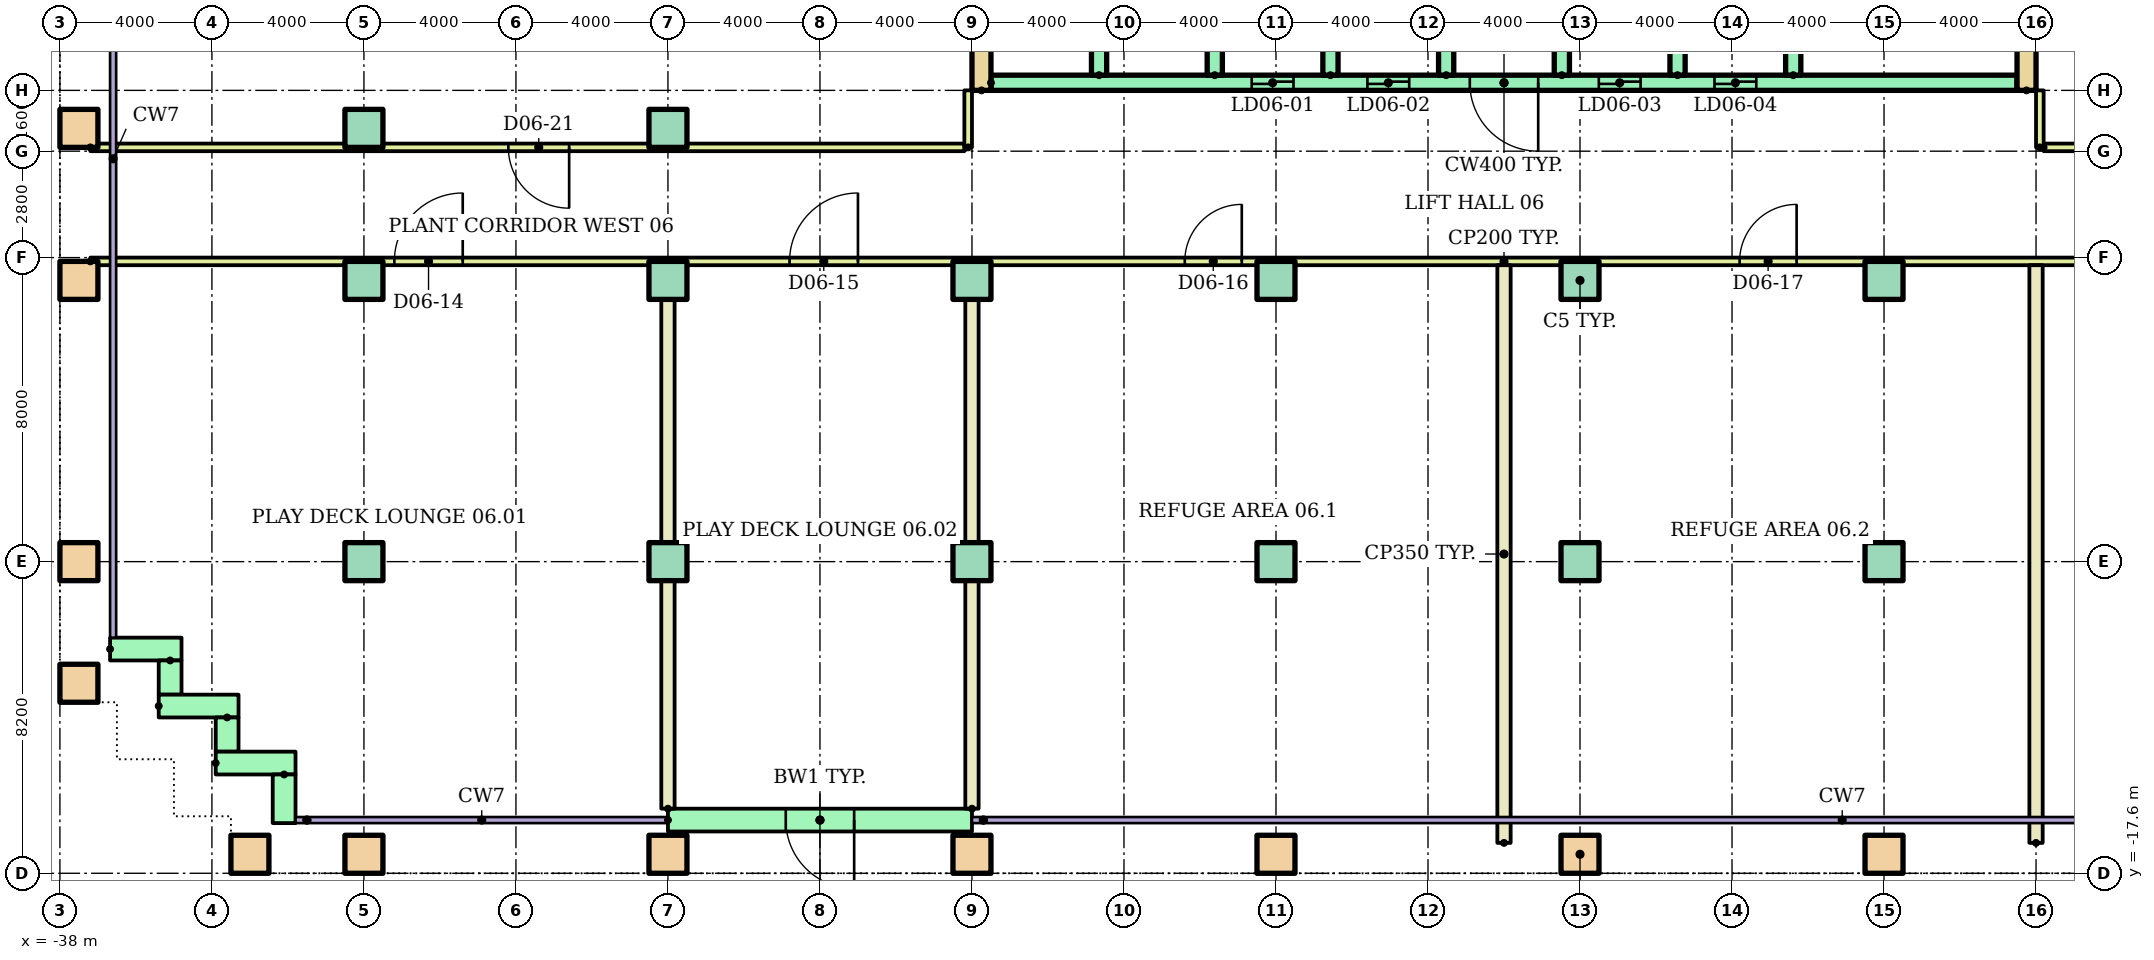
"""IFC4 building model, lengths in metres.
Left out: names, types, materials, properties, quantities, classifications, styles, units other than length and angle.
Written with IfcOpenShell. Run it as: python <this file> out.ifc"""

import sys

from ifc_helpers import new_model, si_unit, direction, frame, frame_2d, origin, origin_2d, place, context, subcontext, project, spatial, rectangle, hollow_rectangle, extrude, element, fill, save


model = new_model("IFC4")
c1 = context("Model", 3, precision=1e-05, world=origin(), true_north=direction((0.0, 1.0)))
c2 = subcontext(c1, "Body", "Model", "MODEL_VIEW")
j1 = project(units=[si_unit("LENGTHUNIT", "METRE"), si_unit("PLANEANGLEUNIT", "RADIAN")], contexts=[c1])
p1 = place(None, origin())
s1 = spatial("IfcSite", under=j1, at=p1, CompositionType="ELEMENT")
p2 = place(p1, origin())
s2 = spatial("IfcBuilding", under=s1, at=p2, CompositionType="ELEMENT")
p3 = place(p2, frame((0.0, 0.0, 26.0)))
s3 = spatial("IfcBuildingStorey", under=s2, at=p3, CompositionType="ELEMENT", Elevation=26.0)
for number, where in (
    (1, (-33.0, -17.1, 0.0)),
    (2, (-30.0, -17.1, 0.0)),
    (3, (-22.0, -17.1, 0.0)),
    (4, (-14.0, -17.1, 0.0)),
    (5, (-6.0, -17.1, 0.0)),
    (6, (2.0, -17.1, 0.0)),
    (7, (10.0, -17.1, 0.0)),
    (8, (-37.5, -12.6, 0.0)),
    (9, (-37.5, -9.4, 0.0)),
):
    element("IfcColumn", number, at=place(p3, frame(where)), inside=s3, PredefinedType="COLUMN", context=c2, shape_type="SweptSolid", body=[
        extrude(hollow_rectangle(XDim=1.0, YDim=1.0, WallThickness=0.05, at=origin_2d()), origin(), (0.0, 0.0, 1.0), 3.9),
    ])
for number, where in (
    (10, (-30.0, -9.4, 0.0)),
    (11, (-22.0, -9.4, 0.0)),
    (12, (-14.0, -9.4, 0.0)),
    (13, (-6.0, -9.4, 0.0)),
    (14, (2.0, -9.4, 0.0)),
    (15, (10.0, -9.4, 0.0)),
):
    element("IfcColumn", number, at=place(p3, frame(where)), inside=s3, PredefinedType="COLUMN", context=c2, shape_type="SweptSolid", body=[
        extrude(rectangle(XDim=1.0, YDim=1.0, at=origin_2d()), origin(), (0.0, 0.0, 1.0), 3.9),
    ])
p4 = place(p3, frame((-37.5, -2.0, 0.0)))
e16 = element("IfcColumn", 16, at=p4, inside=s3, PredefinedType="COLUMN", context=c2, shape_type="SweptSolid", body=[
    extrude(hollow_rectangle(XDim=1.0, YDim=1.0, WallThickness=0.05, at=origin_2d()), origin(), (0.0, 0.0, 1.0), 3.9),
])
for number, where in (
    (17, (-30.0, -2.0, 0.0)),
    (18, (-22.0, -2.0, 0.0)),
    (19, (-14.0, -2.0, 0.0)),
    (20, (-6.0, -2.0, 0.0)),
    (21, (2.0, -2.0, 0.0)),
    (22, (10.0, -2.0, 0.0)),
):
    element("IfcColumn", number, at=place(p3, frame(where)), inside=s3, PredefinedType="COLUMN", context=c2, shape_type="SweptSolid", body=[
        extrude(rectangle(XDim=1.0, YDim=1.0, at=origin_2d()), origin(), (0.0, 0.0, 1.0), 3.9),
    ])
p5 = place(p3, frame((-37.5, 2.0, 0.0)))
e23 = element("IfcColumn", 23, at=p5, inside=s3, PredefinedType="COLUMN", context=c2, shape_type="SweptSolid", body=[
    extrude(hollow_rectangle(XDim=1.0, YDim=1.0, WallThickness=0.05, at=origin_2d()), origin(), (0.0, 0.0, 1.0), 3.9),
])
for number, where in (
    (24, (-30.0, 2.0, 0.0)),
    (25, (-22.0, 2.0, 0.0)),
):
    element("IfcColumn", number, at=place(p3, frame(where)), inside=s3, PredefinedType="COLUMN", context=c2, shape_type="SweptSolid", body=[
        extrude(rectangle(XDim=1.0, YDim=1.0, at=origin_2d()), origin(), (0.0, 0.0, 1.0), 3.9),
    ])
p6 = place(p3, frame((-36.68, -11.7, 0.0)))
e26 = element("IfcWall", 26, at=p6, inside=s3, PredefinedType="STANDARD", context=c2, shape_type="SweptSolid", body=[
    extrude(rectangle(XDim=1.88, YDim=0.6, at=frame_2d((0.94, 0.0))), origin(), (0.0, 0.0, 1.0), 3.6),
])
p7 = place(p3, frame((-35.1, -12.0, 0.0), z_axis=(0.0, 0.0, 1.0), x_axis=(0.0, -1.0, 0.0)))
e27 = element("IfcWall", 27, at=p7, inside=s3, PredefinedType="STANDARD", context=c2, shape_type="SweptSolid", body=[
    extrude(rectangle(XDim=0.9, YDim=0.6, at=frame_2d((0.45, 0.0))), origin(), (0.0, 0.0, 1.0), 3.6),
])
p8 = place(p3, frame((-35.4, -13.2, 0.0)))
e28 = element("IfcWall", 28, at=p8, inside=s3, PredefinedType="STANDARD", context=c2, shape_type="SweptSolid", body=[
    extrude(rectangle(XDim=2.1, YDim=0.6, at=frame_2d((1.05, 0.0))), origin(), (0.0, 0.0, 1.0), 3.6),
])
p9 = place(p3, frame((-33.6, -13.5, 0.0), z_axis=(0.0, 0.0, 1.0), x_axis=(0.0, -1.0, 0.0)))
e29 = element("IfcWall", 29, at=p9, inside=s3, PredefinedType="STANDARD", context=c2, shape_type="SweptSolid", body=[
    extrude(rectangle(XDim=0.9, YDim=0.6, at=frame_2d((0.45, 0.0))), origin(), (0.0, 0.0, 1.0), 3.6),
])
p10 = place(p3, frame((-33.9, -14.7, 0.0)))
e30 = element("IfcWall", 30, at=p10, inside=s3, PredefinedType="STANDARD", context=c2, shape_type="SweptSolid", body=[
    extrude(rectangle(XDim=2.1, YDim=0.6, at=frame_2d((1.05, 0.0))), origin(), (0.0, 0.0, 1.0), 3.6),
])
p11 = place(p3, frame((-32.1, -15.0, 0.0), z_axis=(0.0, 0.0, 1.0), x_axis=(0.0, -1.0, 0.0)))
e31 = element("IfcWall", 31, at=p11, inside=s3, PredefinedType="STANDARD", context=c2, shape_type="SweptSolid", body=[
    extrude(rectangle(XDim=1.28, YDim=0.6, at=frame_2d((0.64, 0.0))), origin(), (0.0, 0.0, 1.0), 3.6),
])
p12 = place(p3, frame((-22.0, -16.2, 0.0)))
e32 = element("IfcWall", 32, at=p12, inside=s3, PredefinedType="STANDARD", context=c2, shape_type="SweptSolid", body=[
    extrude(rectangle(XDim=8.0, YDim=0.6, at=frame_2d((4.0, 0.0))), origin(), (0.0, 0.0, 1.0), 3.6),
])
p13 = place(p12, frame((3.1, 0.0, 0.0)))
e33 = element("IfcOpeningElement", 33, at=p13, cuts=e32, PredefinedType="OPENING", context=c2, shape_type="SweptSolid", body=[
    extrude(rectangle(XDim=1.8, YDim=2.1, at=frame_2d((0.9, 1.05))), frame((0.0, 0.31, 0.0), z_axis=(0.0, -1.0, 0.0), x_axis=(1.0, 0.0, 0.0)), (0.0, 0.0, 1.0), 0.62),
])
for number, where, z_axis, x_axis in (
    (34, (-13.75, 3.0, 0.0), (0.0, 0.0, 1.0), (0.0, 1.0, 0.0)),
    (35, (13.75, 3.0, 0.0), (0.0, 0.0, 1.0), (0.0, 1.0, 0.0)),
):
    element("IfcWall", number, at=place(p3, frame(where, z_axis=z_axis, x_axis=x_axis)), inside=s3, PredefinedType="SHEAR", context=c2, shape_type="SweptSolid", body=[
        extrude(rectangle(XDim=17.0, YDim=0.5, at=frame_2d((8.5, 0.0))), origin(), (0.0, 0.0, 1.0), 3.6),
    ])
p14 = place(p3, frame((-13.5, 3.2, 0.0)))
e36 = element("IfcWall", 36, at=p14, inside=s3, PredefinedType="SHEAR", context=c2, shape_type="SweptSolid", body=[
    extrude(rectangle(XDim=27.0, YDim=0.4, at=frame_2d((13.5, 0.0))), origin(), (0.0, 0.0, 1.0), 3.6),
])
p15 = place(p14, frame((6.861, 0.0, 0.0)))
e37 = element("IfcOpeningElement", 37, at=p15, cuts=e36, PredefinedType="OPENING", context=c2, shape_type="SweptSolid", body=[
    extrude(rectangle(XDim=1.1, YDim=2.1, at=frame_2d((0.55, 1.05))), frame((0.0, 0.21, 0.0), z_axis=(0.0, -1.0, 0.0), x_axis=(1.0, 0.0, 0.0)), (0.0, 0.0, 1.0), 0.42),
])
p16 = place(p14, frame((9.906, 0.0, 0.0)))
e38 = element("IfcOpeningElement", 38, at=p16, cuts=e36, PredefinedType="OPENING", context=c2, shape_type="SweptSolid", body=[
    extrude(rectangle(XDim=1.1, YDim=2.1, at=frame_2d((0.55, 1.05))), frame((0.0, 0.21, 0.0), z_axis=(0.0, -1.0, 0.0), x_axis=(1.0, 0.0, 0.0)), (0.0, 0.0, 1.0), 0.42),
])
p17 = place(p14, frame((15.994, 0.0, 0.0)))
e39 = element("IfcOpeningElement", 39, at=p17, cuts=e36, PredefinedType="OPENING", context=c2, shape_type="SweptSolid", body=[
    extrude(rectangle(XDim=1.1, YDim=2.1, at=frame_2d((0.55, 1.05))), frame((0.0, 0.21, 0.0), z_axis=(0.0, -1.0, 0.0), x_axis=(1.0, 0.0, 0.0)), (0.0, 0.0, 1.0), 0.42),
])
p18 = place(p14, frame((19.039, 0.0, 0.0)))
e40 = element("IfcOpeningElement", 40, at=p18, cuts=e36, PredefinedType="OPENING", context=c2, shape_type="SweptSolid", body=[
    extrude(rectangle(XDim=1.1, YDim=2.1, at=frame_2d((0.55, 1.05))), frame((0.0, 0.21, 0.0), z_axis=(0.0, -1.0, 0.0), x_axis=(1.0, 0.0, 0.0)), (0.0, 0.0, 1.0), 0.42),
])
p19 = place(p14, frame((12.6, 0.0, 0.0)))
e41 = element("IfcOpeningElement", 41, at=p19, cuts=e36, PredefinedType="OPENING", context=c2, shape_type="SweptSolid", body=[
    extrude(rectangle(XDim=1.8, YDim=2.1, at=frame_2d((0.9, 1.05))), frame((0.0, 0.21, 0.0), z_axis=(0.0, -1.0, 0.0), x_axis=(1.0, 0.0, 0.0)), (0.0, 0.0, 1.0), 0.42),
])
for number, where, z_axis, x_axis in (
    (42, (-10.656, 3.4, 0.0), (0.0, 0.0, 1.0), (0.0, 1.0, 0.0)),
    (43, (-7.611, 3.4, 0.0), (0.0, 0.0, 1.0), (0.0, 1.0, 0.0)),
    (44, (-4.567, 3.4, 0.0), (0.0, 0.0, 1.0), (0.0, 1.0, 0.0)),
    (45, (-1.522, 3.4, 0.0), (0.0, 0.0, 1.0), (0.0, 1.0, 0.0)),
    (46, (1.522, 3.4, 0.0), (0.0, 0.0, 1.0), (0.0, 1.0, 0.0)),
    (47, (4.567, 3.4, 0.0), (0.0, 0.0, 1.0), (0.0, 1.0, 0.0)),
    (48, (7.611, 3.4, 0.0), (0.0, 0.0, 1.0), (0.0, 1.0, 0.0)),
):
    element("IfcWall", number, at=place(p3, frame(where, z_axis=z_axis, x_axis=x_axis)), inside=s3, PredefinedType="SHEAR", context=c2, shape_type="SweptSolid", body=[
        extrude(rectangle(XDim=3.0, YDim=0.4, at=frame_2d((1.5, 0.0))), origin(), (0.0, 0.0, 1.0), 3.6),
    ])
p20 = place(p3, frame((-37.2, -1.5, 0.0)))
e49 = element("IfcWall", 49, at=p20, inside=s3, PredefinedType="PARTITIONING", context=c2, shape_type="SweptSolid", body=[
    extrude(rectangle(XDim=74.4, YDim=0.2, at=frame_2d((37.2, 0.0))), origin(), (0.0, 0.0, 1.0), 3.6),
])
p21 = place(p20, frame((8.0, 0.0, 0.0)))
e50 = element("IfcOpeningElement", 50, at=p21, cuts=e49, PredefinedType="OPENING", context=c2, shape_type="SweptSolid", body=[
    extrude(rectangle(XDim=1.8, YDim=2.1, at=frame_2d((0.9, 1.05))), frame((0.0, 0.11, 0.0), z_axis=(0.0, -1.0, 0.0), x_axis=(1.0, 0.0, 0.0)), (0.0, 0.0, 1.0), 0.22),
])
p22 = place(p20, frame((18.4, 0.0, 0.0)))
e51 = element("IfcOpeningElement", 51, at=p22, cuts=e49, PredefinedType="OPENING", context=c2, shape_type="SweptSolid", body=[
    extrude(rectangle(XDim=1.8, YDim=2.1, at=frame_2d((0.9, 1.05))), frame((0.0, 0.11, 0.0), z_axis=(0.0, -1.0, 0.0), x_axis=(1.0, 0.0, 0.0)), (0.0, 0.0, 1.0), 0.22),
])
p23 = place(p20, frame((28.8, 0.0, 0.0)))
e52 = element("IfcOpeningElement", 52, at=p23, cuts=e49, PredefinedType="OPENING", context=c2, shape_type="SweptSolid", body=[
    extrude(rectangle(XDim=1.5, YDim=2.1, at=frame_2d((0.75, 1.05))), frame((0.0, 0.11, 0.0), z_axis=(0.0, -1.0, 0.0), x_axis=(1.0, 0.0, 0.0)), (0.0, 0.0, 1.0), 0.22),
])
p24 = place(p20, frame((43.4, 0.0, 0.0)))
e53 = element("IfcOpeningElement", 53, at=p24, cuts=e49, PredefinedType="OPENING", context=c2, shape_type="SweptSolid", body=[
    extrude(rectangle(XDim=1.5, YDim=2.1, at=frame_2d((0.75, 1.05))), frame((0.0, 0.11, 0.0), z_axis=(0.0, -1.0, 0.0), x_axis=(1.0, 0.0, 0.0)), (0.0, 0.0, 1.0), 0.22),
])
p25 = place(p20, frame((58.6, 0.0, 0.0)))
e54 = element("IfcOpeningElement", 54, at=p25, cuts=e49, PredefinedType="OPENING", context=c2, shape_type="SweptSolid", body=[
    extrude(rectangle(XDim=1.0, YDim=2.4, at=frame_2d((0.5, 1.2))), frame((0.0, 0.11, 0.0), z_axis=(0.0, -1.0, 0.0), x_axis=(1.0, 0.0, 0.0)), (0.0, 0.0, 1.0), 0.22),
])
p26 = place(p20, frame((69.4, 0.0, 0.0)))
e55 = element("IfcOpeningElement", 55, at=p26, cuts=e49, PredefinedType="OPENING", context=c2, shape_type="SweptSolid", body=[
    extrude(rectangle(XDim=1.0, YDim=2.1, at=frame_2d((0.5, 1.05))), frame((0.0, 0.11, 0.0), z_axis=(0.0, -1.0, 0.0), x_axis=(1.0, 0.0, 0.0)), (0.0, 0.0, 1.0), 0.22),
])
p27 = place(p3, frame((-37.2, 1.5, 0.0)))
e56 = element("IfcWall", 56, at=p27, inside=s3, PredefinedType="PARTITIONING", context=c2, shape_type="SweptSolid", body=[
    extrude(rectangle(XDim=23.0, YDim=0.2, at=frame_2d((11.5, 0.0))), origin(), (0.0, 0.0, 1.0), 3.6),
])
p28 = place(p27, frame((11.0, 0.0, 0.0)))
e57 = element("IfcOpeningElement", 57, at=p28, cuts=e56, PredefinedType="OPENING", context=c2, shape_type="SweptSolid", body=[
    extrude(rectangle(XDim=1.6, YDim=2.4, at=frame_2d((0.8, 1.2))), frame((0.0, 0.11, 0.0), z_axis=(0.0, -1.0, 0.0), x_axis=(1.0, 0.0, 0.0)), (0.0, 0.0, 1.0), 0.22),
])
p29 = place(p3, frame((14.2, 1.5, 0.0)))
e58 = element("IfcWall", 58, at=p29, inside=s3, PredefinedType="PARTITIONING", context=c2, shape_type="SweptSolid", body=[
    extrude(rectangle(XDim=23.0, YDim=0.2, at=frame_2d((11.5, 0.0))), origin(), (0.0, 0.0, 1.0), 3.6),
])
p30 = place(p29, frame((9.4, 0.0, 0.0)))
e59 = element("IfcOpeningElement", 59, at=p30, cuts=e58, PredefinedType="OPENING", context=c2, shape_type="SweptSolid", body=[
    extrude(rectangle(XDim=1.6, YDim=2.4, at=frame_2d((0.8, 1.2))), frame((0.0, 0.11, 0.0), z_axis=(0.0, -1.0, 0.0), x_axis=(1.0, 0.0, 0.0)), (0.0, 0.0, 1.0), 0.22),
])
for number, where, z_axis, x_axis in (
    (60, (-14.1, 1.5, 0.0), (0.0, 0.0, 1.0), (0.0, 1.0, 0.0)),
    (61, (14.1, 1.5, 0.0), (0.0, 0.0, 1.0), (0.0, 1.0, 0.0)),
):
    element("IfcWall", number, at=place(p3, frame(where, z_axis=z_axis, x_axis=x_axis)), inside=s3, PredefinedType="PARTITIONING", context=c2, shape_type="SweptSolid", body=[
        extrude(rectangle(XDim=1.5, YDim=0.2, at=frame_2d((0.75, 0.0))), origin(), (0.0, 0.0, 1.0), 3.6),
    ])
for number, where, z_axis, x_axis in (
    (62, (-22.0, -15.9, 0.0), (0.0, 0.0, 1.0), (0.0, 1.0, 0.0)),
    (63, (-14.0, -15.9, 0.0), (0.0, 0.0, 1.0), (0.0, 1.0, 0.0)),
):
    element("IfcWall", number, at=place(p3, frame(where, z_axis=z_axis, x_axis=x_axis)), inside=s3, PredefinedType="PARTITIONING", context=c2, shape_type="SweptSolid", body=[
        extrude(rectangle(XDim=14.3, YDim=0.35, at=frame_2d((7.15, 0.0))), origin(), (0.0, 0.0, 1.0), 3.6),
    ])
for number, where, z_axis, x_axis in (
    (64, (0.0, -16.8, 0.0), (0.0, 0.0, 1.0), (0.0, 1.0, 0.0)),
    (65, (14.0, -16.8, 0.0), (0.0, 0.0, 1.0), (0.0, 1.0, 0.0)),
):
    element("IfcWall", number, at=place(p3, frame(where, z_axis=z_axis, x_axis=x_axis)), inside=s3, PredefinedType="PARTITIONING", context=c2, shape_type="SweptSolid", body=[
        extrude(rectangle(XDim=15.2, YDim=0.35, at=frame_2d((7.6, 0.0))), origin(), (0.0, 0.0, 1.0), 3.6),
    ])
p31 = place(p13, frame((1.8, 0.0, 0.0), z_axis=(0.0, 0.0, 1.0), x_axis=(-1.0, 0.0, 0.0)))
e66 = element("IfcDoor", 66, at=p31, inside=s3, OperationType="DOUBLE_DOOR_SINGLE_SWING", PredefinedType="DOOR", context=c2, shape_type="SweptSolid", body=[
    extrude(rectangle(XDim=1.8, YDim=2.1, at=frame_2d((0.9, 1.05))), frame((0.0, 0.025, 0.0), z_axis=(0.0, -1.0, 0.0), x_axis=(1.0, 0.0, 0.0)), (0.0, 0.0, 1.0), 0.05),
])
fill(e33, e66)
p32 = place(p15, origin())
e67 = element("IfcDoor", 67, at=p32, inside=s3, OperationType="SLIDING_TO_LEFT", PredefinedType="DOOR", context=c2, shape_type="SweptSolid", body=[
    extrude(rectangle(XDim=1.1, YDim=2.1, at=frame_2d((0.55, 1.05))), frame((0.0, 0.025, 0.0), z_axis=(0.0, -1.0, 0.0), x_axis=(1.0, 0.0, 0.0)), (0.0, 0.0, 1.0), 0.05),
])
fill(e37, e67)
p33 = place(p16, origin())
e68 = element("IfcDoor", 68, at=p33, inside=s3, OperationType="SLIDING_TO_LEFT", PredefinedType="DOOR", context=c2, shape_type="SweptSolid", body=[
    extrude(rectangle(XDim=1.1, YDim=2.1, at=frame_2d((0.55, 1.05))), frame((0.0, 0.025, 0.0), z_axis=(0.0, -1.0, 0.0), x_axis=(1.0, 0.0, 0.0)), (0.0, 0.0, 1.0), 0.05),
])
fill(e38, e68)
p34 = place(p17, origin())
e69 = element("IfcDoor", 69, at=p34, inside=s3, OperationType="SLIDING_TO_LEFT", PredefinedType="DOOR", context=c2, shape_type="SweptSolid", body=[
    extrude(rectangle(XDim=1.1, YDim=2.1, at=frame_2d((0.55, 1.05))), frame((0.0, 0.025, 0.0), z_axis=(0.0, -1.0, 0.0), x_axis=(1.0, 0.0, 0.0)), (0.0, 0.0, 1.0), 0.05),
])
fill(e39, e69)
p35 = place(p18, origin())
e70 = element("IfcDoor", 70, at=p35, inside=s3, OperationType="SLIDING_TO_LEFT", PredefinedType="DOOR", context=c2, shape_type="SweptSolid", body=[
    extrude(rectangle(XDim=1.1, YDim=2.1, at=frame_2d((0.55, 1.05))), frame((0.0, 0.025, 0.0), z_axis=(0.0, -1.0, 0.0), x_axis=(1.0, 0.0, 0.0)), (0.0, 0.0, 1.0), 0.05),
])
fill(e40, e70)
p36 = place(p19, frame((1.8, 0.0, 0.0), z_axis=(0.0, 0.0, 1.0), x_axis=(-1.0, 0.0, 0.0)))
e71 = element("IfcDoor", 71, at=p36, inside=s3, OperationType="DOUBLE_DOOR_SINGLE_SWING", PredefinedType="DOOR", context=c2, shape_type="SweptSolid", body=[
    extrude(rectangle(XDim=1.8, YDim=2.1, at=frame_2d((0.9, 1.05))), frame((0.0, 0.025, 0.0), z_axis=(0.0, -1.0, 0.0), x_axis=(1.0, 0.0, 0.0)), (0.0, 0.0, 1.0), 0.05),
])
fill(e41, e71)
p37 = place(p21, origin())
e72 = element("IfcDoor", 72, at=p37, inside=s3, OperationType="DOUBLE_DOOR_SINGLE_SWING", PredefinedType="DOOR", context=c2, shape_type="SweptSolid", body=[
    extrude(rectangle(XDim=1.8, YDim=2.1, at=frame_2d((0.9, 1.05))), frame((0.0, 0.025, 0.0), z_axis=(0.0, -1.0, 0.0), x_axis=(1.0, 0.0, 0.0)), (0.0, 0.0, 1.0), 0.05),
])
fill(e50, e72)
p38 = place(p22, origin())
e73 = element("IfcDoor", 73, at=p38, inside=s3, OperationType="DOUBLE_DOOR_SINGLE_SWING", PredefinedType="DOOR", context=c2, shape_type="SweptSolid", body=[
    extrude(rectangle(XDim=1.8, YDim=2.1, at=frame_2d((0.9, 1.05))), frame((0.0, 0.025, 0.0), z_axis=(0.0, -1.0, 0.0), x_axis=(1.0, 0.0, 0.0)), (0.0, 0.0, 1.0), 0.05),
])
fill(e51, e73)
p39 = place(p23, origin())
e74 = element("IfcDoor", 74, at=p39, inside=s3, OperationType="DOUBLE_DOOR_SINGLE_SWING", PredefinedType="DOOR", context=c2, shape_type="SweptSolid", body=[
    extrude(rectangle(XDim=1.5, YDim=2.1, at=frame_2d((0.75, 1.05))), frame((0.0, 0.025, 0.0), z_axis=(0.0, -1.0, 0.0), x_axis=(1.0, 0.0, 0.0)), (0.0, 0.0, 1.0), 0.05),
])
fill(e52, e74)
p40 = place(p24, origin())
e75 = element("IfcDoor", 75, at=p40, inside=s3, OperationType="DOUBLE_DOOR_SINGLE_SWING", PredefinedType="DOOR", context=c2, shape_type="SweptSolid", body=[
    extrude(rectangle(XDim=1.5, YDim=2.1, at=frame_2d((0.75, 1.05))), frame((0.0, 0.025, 0.0), z_axis=(0.0, -1.0, 0.0), x_axis=(1.0, 0.0, 0.0)), (0.0, 0.0, 1.0), 0.05),
])
fill(e53, e75)
p41 = place(p28, frame((1.6, 0.0, 0.0), z_axis=(0.0, 0.0, 1.0), x_axis=(-1.0, 0.0, 0.0)))
e76 = element("IfcDoor", 76, at=p41, inside=s3, OperationType="DOUBLE_DOOR_SINGLE_SWING", PredefinedType="DOOR", context=c2, shape_type="SweptSolid", body=[
    extrude(rectangle(XDim=1.6, YDim=2.4, at=frame_2d((0.8, 1.2))), frame((0.0, 0.025, 0.0), z_axis=(0.0, -1.0, 0.0), x_axis=(1.0, 0.0, 0.0)), (0.0, 0.0, 1.0), 0.05),
])
fill(e57, e76)
save(model, sys.argv[1])
